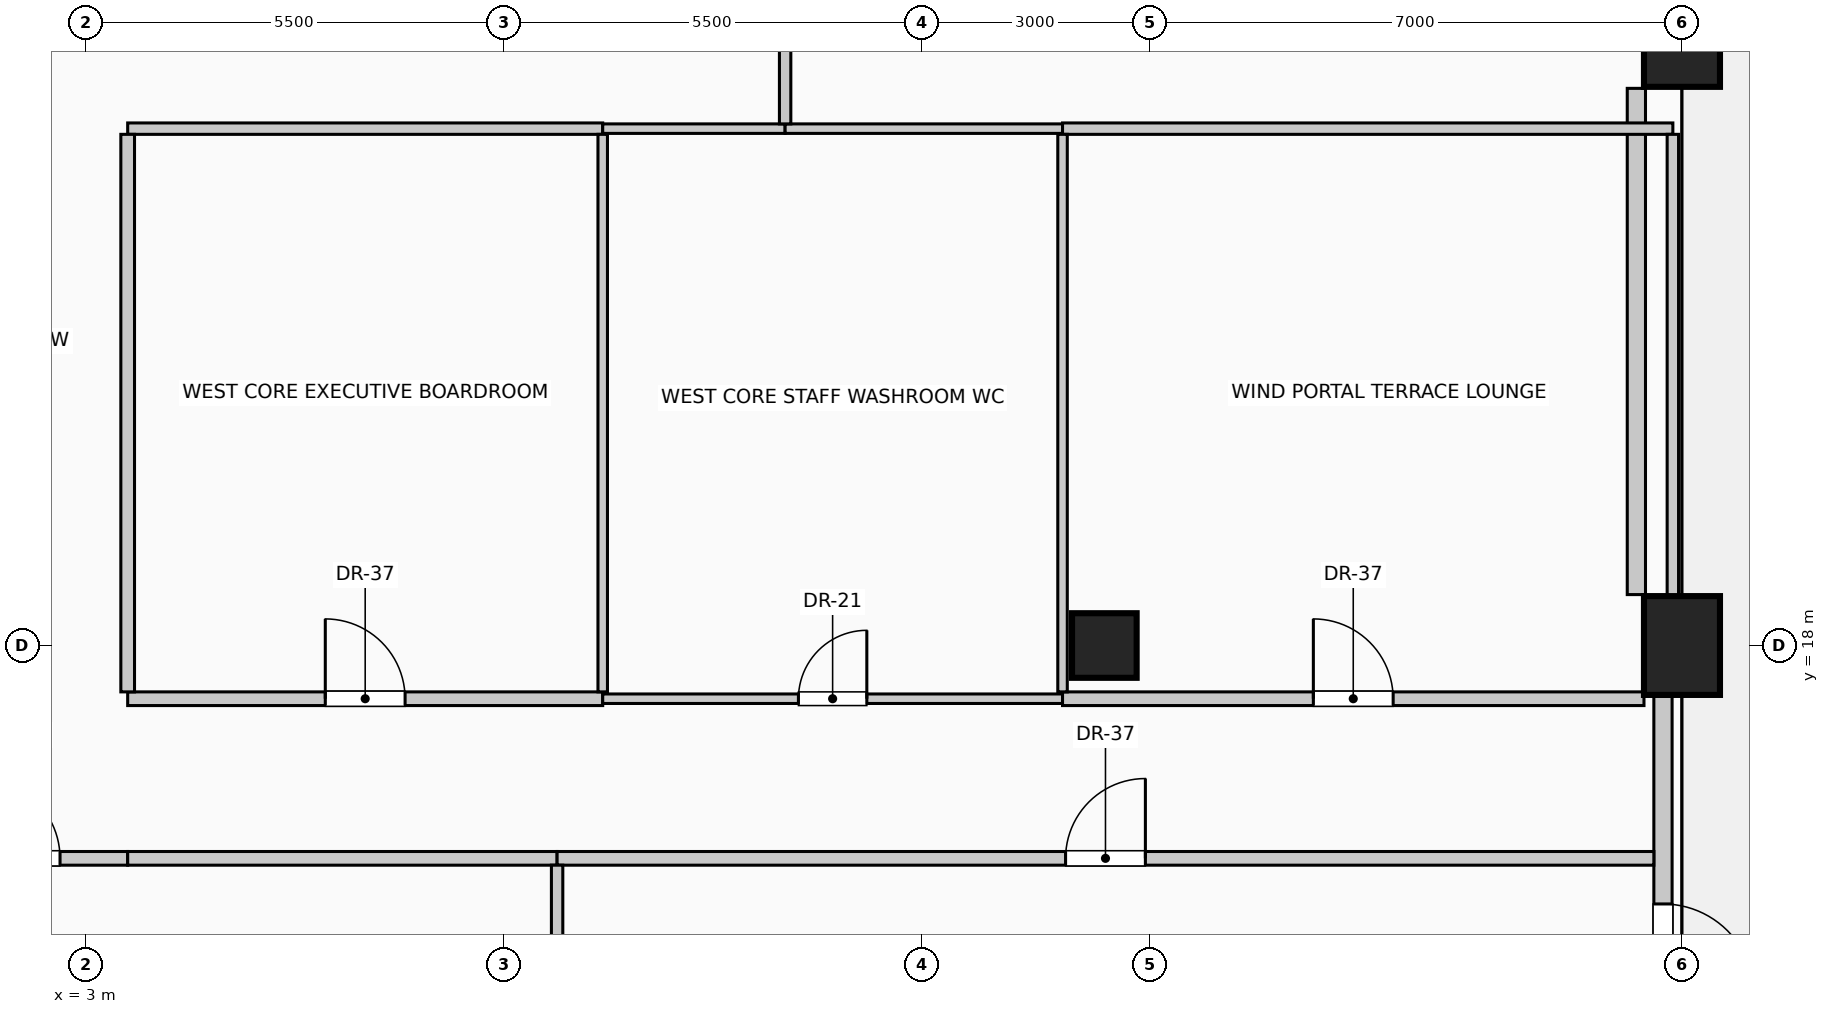
"""IFC4 building model, lengths in metres.
Left out: names, types, materials, properties, quantities, classifications, styles, units other than length and angle.
Written with IfcOpenShell. Run it as: python <this file> out.ifc"""

import sys

from ifc_helpers import new_model, si_unit, direction, frame, frame_2d, origin, origin_2d, place, context, subcontext, project, spatial, rectangle, circle, extrude, element, fill, save


model = new_model("IFC4")
c1 = context("Model", 3, precision=1e-05, world=origin(), true_north=direction((0.0, 1.0)))
c2 = subcontext(c1, "Body", "Model", "MODEL_VIEW")
j1 = project(units=[si_unit("LENGTHUNIT", "METRE"), si_unit("PLANEANGLEUNIT", "RADIAN")], contexts=[c1])
p1 = place(None, origin())
s1 = spatial("IfcSite", under=j1, at=p1, CompositionType="ELEMENT")
p2 = place(p1, origin())
s2 = spatial("IfcBuilding", under=s1, at=p2, CompositionType="ELEMENT")
p3 = place(p2, frame((0.0, 0.0, 182.6)))
s3 = spatial("IfcBuildingStorey", under=s2, at=p3, CompositionType="ELEMENT", Elevation=182.6)
for number, where, z_axis, x_axis in (
    (1, (24.0, 18.0, 0.0), (0.0, 0.0, 1.0), (1.0, 0.0, 0.0)),
    (2, (24.0, 26.0, 0.0), (0.0, 0.0, 1.0), (1.0, 0.0, 0.0)),
):
    element("IfcColumn", number, at=place(p3, frame(where, z_axis=z_axis, x_axis=x_axis)), inside=s3, PredefinedType="COLUMN", context=c2, shape_type="SweptSolid", body=[
        extrude(rectangle(XDim=1.0, YDim=1.3, at=origin_2d()), origin(), (0.0, 0.0, 1.0), 4.0),
    ])
p4 = place(p3, frame((16.4, 18.0, 0.0), z_axis=(0.0, 0.0, 1.0), x_axis=(1.0, 0.0, 0.0)))
e3 = element("IfcColumn", 3, at=p4, inside=s3, PredefinedType="COLUMN", context=c2, shape_type="SweptSolid", body=[
    extrude(circle(Radius=0.425, at=origin_2d()), origin(), (0.0, 0.0, 1.0), 4.0),
])
p5 = place(p3, frame((23.75, 17.33, 0.0), z_axis=(0.0, 0.0, 1.0), x_axis=(0.0, -1.0, 0.0)))
e4 = element("IfcWall", 4, at=p5, inside=s3, PredefinedType="SOLIDWALL", context=c2, shape_type="SweptSolid", body=[
    extrude(rectangle(XDim=6.66, YDim=0.24, at=frame_2d((3.33, 0.0))), origin(), (0.0, 0.0, 1.0), 3.15),
])
p6 = place(p5, frame((2.73, 0.0, 0.0)))
e5 = element("IfcOpeningElement", 5, at=p6, cuts=e4, PredefinedType="OPENING", context=c2, shape_type="SweptSolid", body=[
    extrude(rectangle(XDim=1.2, YDim=2.25, at=frame_2d((0.6, 1.125))), frame((0.0, 0.13, 0.0), z_axis=(0.0, -1.0, 0.0), x_axis=(1.0, 0.0, 0.0)), (0.0, 0.0, 1.0), 0.26),
])
p7 = place(p3, frame((23.4, 25.33, 0.0), z_axis=(0.0, 0.0, 1.0), x_axis=(0.0, -1.0, 0.0)))
e6 = element("IfcWall", 6, at=p7, inside=s3, PredefinedType="SOLIDWALL", context=c2, shape_type="SweptSolid", body=[
    extrude(rectangle(XDim=6.66, YDim=0.24, at=frame_2d((3.33, 0.0))), origin(), (0.0, 0.0, 1.0), 3.75),
])
p8 = place(p3, frame((0.72, 15.2, 0.0), z_axis=(0.0, 0.0, 1.0), x_axis=(1.0, 0.0, 0.0)))
e7 = element("IfcWall", 7, at=p8, inside=s3, PredefinedType="PARTITIONING", context=c2, shape_type="SweptSolid", body=[
    extrude(rectangle(XDim=2.83, YDim=0.18, at=frame_2d((1.415, 0.0))), origin(), (0.0, 0.0, 1.0), 3.75),
])
p9 = place(p8, frame((0.89, 0.0, 0.0)))
e8 = element("IfcOpeningElement", 8, at=p9, cuts=e7, PredefinedType="OPENING", context=c2, shape_type="SweptSolid", body=[
    extrude(rectangle(XDim=1.05, YDim=2.15, at=frame_2d((0.525, 1.075))), frame((0.0, 0.1, 0.0), z_axis=(0.0, -1.0, 0.0), x_axis=(1.0, 0.0, 0.0)), (0.0, 0.0, 1.0), 0.2),
])
p10 = place(p3, frame((3.55, 15.2, 0.0), z_axis=(0.0, 0.0, 1.0), x_axis=(1.0, 0.0, 0.0)))
e9 = element("IfcWall", 9, at=p10, inside=s3, PredefinedType="PARTITIONING", context=c2, shape_type="SweptSolid", body=[
    extrude(rectangle(XDim=5.65, YDim=0.18, at=frame_2d((2.825, 0.0))), origin(), (0.0, 0.0, 1.0), 3.75),
])
p11 = place(p3, frame((9.2, 15.2, 0.0), z_axis=(0.0, 0.0, 1.0), x_axis=(1.0, 0.0, 0.0)))
e10 = element("IfcWall", 10, at=p11, inside=s3, PredefinedType="PARTITIONING", context=c2, shape_type="SweptSolid", body=[
    extrude(rectangle(XDim=14.43, YDim=0.18, at=frame_2d((7.215, 0.0))), origin(), (0.0, 0.0, 1.0), 3.75),
])
p12 = place(p11, frame((6.69, 0.0, 0.0)))
e11 = element("IfcOpeningElement", 11, at=p12, cuts=e10, PredefinedType="OPENING", context=c2, shape_type="SweptSolid", body=[
    extrude(rectangle(XDim=1.05, YDim=2.15, at=frame_2d((0.525, 1.075))), frame((0.0, 0.1, 0.0), z_axis=(0.0, -1.0, 0.0), x_axis=(1.0, 0.0, 0.0)), (0.0, 0.0, 1.0), 0.2),
])
p13 = place(p3, frame((3.55, 17.3, 0.0), z_axis=(0.0, 0.0, 1.0), x_axis=(1.0, 0.0, 0.0)))
e12 = element("IfcWall", 12, at=p13, inside=s3, PredefinedType="PARTITIONING", context=c2, shape_type="SweptSolid", body=[
    extrude(rectangle(XDim=6.25, YDim=0.18, at=frame_2d((3.125, 0.0))), origin(), (0.0, 0.0, 1.0), 3.75),
])
p14 = place(p13, frame((2.6, 0.0, 0.0)))
e13 = element("IfcOpeningElement", 13, at=p14, cuts=e12, PredefinedType="OPENING", context=c2, shape_type="SweptSolid", body=[
    extrude(rectangle(XDim=1.05, YDim=2.15, at=frame_2d((0.525, 1.075))), frame((0.0, 0.1, 0.0), z_axis=(0.0, -1.0, 0.0), x_axis=(1.0, 0.0, 0.0)), (0.0, 0.0, 1.0), 0.2),
])
p15 = place(p3, frame((9.8, 17.3, 0.0), z_axis=(0.0, 0.0, 1.0), x_axis=(1.0, 0.0, 0.0)))
e14 = element("IfcWall", 14, at=p15, inside=s3, PredefinedType="PARTITIONING", context=c2, shape_type="SweptSolid", body=[
    extrude(rectangle(XDim=6.05, YDim=0.125, at=frame_2d((3.025, 0.0))), origin(), (0.0, 0.0, 1.0), 3.75),
])
p16 = place(p15, frame((2.575, 0.0, 0.0)))
e15 = element("IfcOpeningElement", 15, at=p16, cuts=e14, PredefinedType="OPENING", context=c2, shape_type="SweptSolid", body=[
    extrude(rectangle(XDim=0.9, YDim=2.1, at=frame_2d((0.45, 1.05))), frame((0.0, 0.073, 0.0), z_axis=(0.0, -1.0, 0.0), x_axis=(1.0, 0.0, 0.0)), (0.0, 0.0, 1.0), 0.145),
])
p17 = place(p3, frame((15.85, 17.3, 0.0), z_axis=(0.0, 0.0, 1.0), x_axis=(1.0, 0.0, 0.0)))
e16 = element("IfcWall", 16, at=p17, inside=s3, PredefinedType="PARTITIONING", context=c2, shape_type="SweptSolid", body=[
    extrude(rectangle(XDim=7.65, YDim=0.18, at=frame_2d((3.825, 0.0))), origin(), (0.0, 0.0, 1.0), 3.75),
])
p18 = place(p17, frame((3.3, 0.0, 0.0)))
e17 = element("IfcOpeningElement", 17, at=p18, cuts=e16, PredefinedType="OPENING", context=c2, shape_type="SweptSolid", body=[
    extrude(rectangle(XDim=1.05, YDim=2.15, at=frame_2d((0.525, 1.075))), frame((0.0, 0.1, 0.0), z_axis=(0.0, -1.0, 0.0), x_axis=(1.0, 0.0, 0.0)), (0.0, 0.0, 1.0), 0.2),
])
p19 = place(p3, frame((3.55, 24.8, 0.0), z_axis=(0.0, 0.0, 1.0), x_axis=(1.0, 0.0, 0.0)))
e18 = element("IfcWall", 18, at=p19, inside=s3, PredefinedType="PARTITIONING", context=c2, shape_type="SweptSolid", body=[
    extrude(rectangle(XDim=6.25, YDim=0.15, at=frame_2d((3.125, 0.0))), origin(), (0.0, 0.0, 1.0), 3.75),
])
p20 = place(p3, frame((9.8, 24.8, 0.0), z_axis=(0.0, 0.0, 1.0), x_axis=(1.0, 0.0, 0.0)))
e19 = element("IfcWall", 19, at=p20, inside=s3, PredefinedType="PARTITIONING", context=c2, shape_type="SweptSolid", body=[
    extrude(rectangle(XDim=2.4, YDim=0.125, at=frame_2d((1.2, 0.0))), origin(), (0.0, 0.0, 1.0), 3.75),
])
p21 = place(p3, frame((12.2, 24.8, 0.0), z_axis=(0.0, 0.0, 1.0), x_axis=(1.0, 0.0, 0.0)))
e20 = element("IfcWall", 20, at=p21, inside=s3, PredefinedType="PARTITIONING", context=c2, shape_type="SweptSolid", body=[
    extrude(rectangle(XDim=3.65, YDim=0.125, at=frame_2d((1.825, 0.0))), origin(), (0.0, 0.0, 1.0), 3.75),
])
p22 = place(p3, frame((15.85, 24.8, 0.0), z_axis=(0.0, 0.0, 1.0), x_axis=(1.0, 0.0, 0.0)))
e21 = element("IfcWall", 21, at=p22, inside=s3, PredefinedType="PARTITIONING", context=c2, shape_type="SweptSolid", body=[
    extrude(rectangle(XDim=8.03, YDim=0.15, at=frame_2d((4.015, 0.0))), origin(), (0.0, 0.0, 1.0), 3.75),
])
p23 = place(p3, frame((3.55, 17.39, 0.0), z_axis=(0.0, 0.0, 1.0), x_axis=(0.0, 1.0, 0.0)))
e22 = element("IfcWall", 22, at=p23, inside=s3, PredefinedType="PARTITIONING", context=c2, shape_type="SweptSolid", body=[
    extrude(rectangle(XDim=7.335, YDim=0.18, at=frame_2d((3.667, 0.0))), origin(), (0.0, 0.0, 1.0), 3.75),
])
p24 = place(p3, frame((9.2, 0.72, 0.0), z_axis=(0.0, 0.0, 1.0), x_axis=(0.0, 1.0, 0.0)))
e23 = element("IfcWall", 23, at=p24, inside=s3, PredefinedType="PARTITIONING", context=c2, shape_type="SweptSolid", body=[
    extrude(rectangle(XDim=14.39, YDim=0.15, at=frame_2d((7.195, 0.0))), origin(), (0.0, 0.0, 1.0), 3.75),
])
p25 = place(p3, frame((9.8, 17.39, 0.0), z_axis=(0.0, 0.0, 1.0), x_axis=(0.0, 1.0, 0.0)))
e24 = element("IfcWall", 24, at=p25, inside=s3, PredefinedType="PARTITIONING", context=c2, shape_type="SweptSolid", body=[
    extrude(rectangle(XDim=7.335, YDim=0.125, at=frame_2d((3.667, 0.0))), origin(), (0.0, 0.0, 1.0), 3.75),
])
p26 = place(p3, frame((12.2, 24.863, 0.0), z_axis=(0.0, 0.0, 1.0), x_axis=(0.0, 1.0, 0.0)))
e25 = element("IfcWall", 25, at=p26, inside=s3, PredefinedType="PARTITIONING", context=c2, shape_type="SweptSolid", body=[
    extrude(rectangle(XDim=1.875, YDim=0.15, at=frame_2d((0.938, 0.0))), origin(), (0.0, 0.0, 1.0), 3.75),
])
p27 = place(p3, frame((15.85, 17.39, 0.0), z_axis=(0.0, 0.0, 1.0), x_axis=(0.0, 1.0, 0.0)))
e26 = element("IfcWall", 26, at=p27, inside=s3, PredefinedType="PARTITIONING", context=c2, shape_type="SweptSolid", body=[
    extrude(rectangle(XDim=7.335, YDim=0.125, at=frame_2d((3.667, 0.0))), origin(), (0.0, 0.0, 1.0), 3.75),
])
p28 = place(p3, frame((23.88, 18.65, 0.0), z_axis=(0.0, 0.0, 1.0), x_axis=(0.0, 1.0, 0.0)))
e27 = element("IfcWall", 27, at=p28, inside=s3, PredefinedType="PARTITIONING", context=c2, shape_type="SweptSolid", body=[
    extrude(rectangle(XDim=6.075, YDim=0.15, at=frame_2d((3.038, 0.0))), origin(), (0.0, 0.0, 1.0), 3.145),
])
p29 = place(p6, origin())
e28 = element("IfcDoor", 28, at=p29, inside=s3, OperationType="SINGLE_SWING_RIGHT", PredefinedType="DOOR", context=c2, shape_type="SweptSolid", body=[
    extrude(rectangle(XDim=1.2, YDim=2.25, at=frame_2d((0.6, 1.125))), frame((0.0, 0.025, 0.0), z_axis=(0.0, -1.0, 0.0), x_axis=(1.0, 0.0, 0.0)), (0.0, 0.0, 1.0), 0.05),
])
fill(e5, e28)
p30 = place(p9, origin())
e29 = element("IfcDoor", 29, at=p30, inside=s3, OperationType="SINGLE_SWING_LEFT", PredefinedType="DOOR", context=c2, shape_type="SweptSolid", body=[
    extrude(rectangle(XDim=1.05, YDim=2.15, at=frame_2d((0.525, 1.075))), frame((0.0, 0.025, 0.0), z_axis=(0.0, -1.0, 0.0), x_axis=(1.0, 0.0, 0.0)), (0.0, 0.0, 1.0), 0.05),
])
fill(e8, e29)
p31 = place(p12, origin())
e30 = element("IfcDoor", 30, at=p31, inside=s3, OperationType="SINGLE_SWING_RIGHT", PredefinedType="DOOR", context=c2, shape_type="SweptSolid", body=[
    extrude(rectangle(XDim=1.05, YDim=2.15, at=frame_2d((0.525, 1.075))), frame((0.0, 0.025, 0.0), z_axis=(0.0, -1.0, 0.0), x_axis=(1.0, 0.0, 0.0)), (0.0, 0.0, 1.0), 0.05),
])
fill(e11, e30)
p32 = place(p14, origin())
e31 = element("IfcDoor", 31, at=p32, inside=s3, OperationType="SINGLE_SWING_LEFT", PredefinedType="DOOR", context=c2, shape_type="SweptSolid", body=[
    extrude(rectangle(XDim=1.05, YDim=2.15, at=frame_2d((0.525, 1.075))), frame((0.0, 0.025, 0.0), z_axis=(0.0, -1.0, 0.0), x_axis=(1.0, 0.0, 0.0)), (0.0, 0.0, 1.0), 0.05),
])
fill(e13, e31)
p33 = place(p16, origin())
e32 = element("IfcDoor", 32, at=p33, inside=s3, OperationType="SINGLE_SWING_RIGHT", PredefinedType="DOOR", context=c2, shape_type="SweptSolid", body=[
    extrude(rectangle(XDim=0.9, YDim=2.1, at=frame_2d((0.45, 1.05))), frame((0.0, 0.025, 0.0), z_axis=(0.0, -1.0, 0.0), x_axis=(1.0, 0.0, 0.0)), (0.0, 0.0, 1.0), 0.05),
])
fill(e15, e32)
p34 = place(p18, origin())
e33 = element("IfcDoor", 33, at=p34, inside=s3, OperationType="SINGLE_SWING_LEFT", PredefinedType="DOOR", context=c2, shape_type="SweptSolid", body=[
    extrude(rectangle(XDim=1.05, YDim=2.15, at=frame_2d((0.525, 1.075))), frame((0.0, 0.025, 0.0), z_axis=(0.0, -1.0, 0.0), x_axis=(1.0, 0.0, 0.0)), (0.0, 0.0, 1.0), 0.05),
])
fill(e17, e33)
save(model, sys.argv[1])
